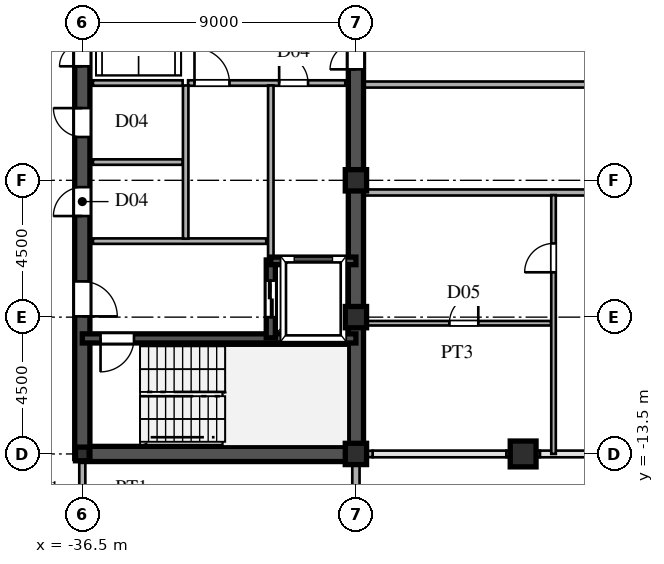
"""IFC4 building model, lengths in metres.
Left out: names, types, materials, properties, quantities, classifications, styles, units other than length and angle.
Written with IfcOpenShell. Run it as: python <this file> out.ifc"""

import sys

from ifc_helpers import new_model, si_unit, direction, frame, frame_2d, origin, origin_2d, place, context, subcontext, project, spatial, rectangle, hollow_rectangle, i_section, extrude, source, transform, mapped, element, fill, save


model = new_model("IFC4")
c1 = context("Model", 3, precision=1e-05, world=origin(), true_north=direction((0.0, 1.0)))
c2 = subcontext(c1, "Body", "Model", "MODEL_VIEW")
j1 = project(units=[si_unit("LENGTHUNIT", "METRE"), si_unit("PLANEANGLEUNIT", "RADIAN")], contexts=[c1])
p1 = place(None, origin())
s1 = spatial("IfcSite", under=j1, at=p1, CompositionType="ELEMENT")
p2 = place(p1, origin())
s2 = spatial("IfcBuilding", under=s1, at=p2, CompositionType="ELEMENT")
p3 = place(p2, frame((0.0, 0.0, 258.15)))
s3 = spatial("IfcBuildingStorey", under=s2, at=p3, CompositionType="ELEMENT", Elevation=258.15)
m1 = source(origin(), c2, "Body", "SweptSolid", [
    extrude(hollow_rectangle(XDim=0.7, YDim=0.7, WallThickness=0.03, at=origin_2d()), origin(), (0.0, 0.0, 1.0), 3.75),
])
for number, where, z_axis, x_axis in (
    (1, (-27.5, -13.5, 0.0), (0.0, 0.0, 1.0), (1.0, 0.0, 0.0)),
    (2, (-27.5, -9.0, 0.0), (0.0, 0.0, 1.0), (1.0, 0.0, 0.0)),
    (3, (-27.5, -4.5, 0.0), (0.0, 0.0, 1.0), (1.0, 0.0, 0.0)),
):
    element("IfcColumn", number, at=place(p3, frame(where, z_axis=z_axis, x_axis=x_axis)), inside=s3, PredefinedType="COLUMN", context=c2, shape_type="MappedRepresentation", body=[
        mapped(m1, transform((0.0, 0.0, 0.0), scale=1.0)),
    ])
m2 = source(origin(), c2, "Body", "SweptSolid", [
    extrude(i_section(OverallWidth=0.45, OverallDepth=0.45, WebThickness=0.016, FlangeThickness=0.025, at=origin_2d()), origin(), (0.0, 0.0, 1.0), 3.75),
])
p4 = place(p3, frame((-36.5, -13.5, 0.0), z_axis=(0.0, 0.0, 1.0), x_axis=(1.0, 0.0, 0.0)))
e4 = element("IfcColumn", 4, at=p4, inside=s3, PredefinedType="COLUMN", context=c2, shape_type="MappedRepresentation", body=[
    mapped(m2, transform((0.0, 0.0, 0.0), scale=1.0)),
])
m3 = source(origin(), c2, "Body", "SweptSolid", [
    extrude(hollow_rectangle(XDim=0.85, YDim=0.85, WallThickness=0.036, at=origin_2d()), origin(), (0.0, 0.0, 1.0), 3.75),
])
p5 = place(p3, frame((-22.0, -13.5, 0.0), z_axis=(0.0, 0.0, 1.0), x_axis=(1.0, 0.0, 0.0)))
e5 = element("IfcColumn", 5, at=p5, inside=s3, PredefinedType="COLUMN", context=c2, shape_type="MappedRepresentation", body=[
    mapped(m3, transform((0.0, 0.0, 0.0), scale=1.0)),
])
p6 = place(p3, frame((-27.5, -15.98, 0.0), z_axis=(0.0, 0.0, 1.0), x_axis=(0.0, 1.0, 0.0)))
e6 = element("IfcWall", 6, at=p6, inside=s3, PredefinedType="SOLIDWALL", context=c2, shape_type="SweptSolid", body=[
    extrude(rectangle(XDim=1.605, YDim=0.24, at=frame_2d((0.803, 0.0))), origin(), (0.0, 0.0, 1.0), 3.53),
])
p7 = place(p3, frame((-27.5, -14.375, 0.0), z_axis=(0.0, 0.0, 1.0), x_axis=(0.0, 1.0, 0.0)))
e7 = element("IfcWall", 7, at=p7, inside=s3, PredefinedType="SOLIDWALL", context=c2, shape_type="SweptSolid", body=[
    extrude(rectangle(XDim=0.62, YDim=0.24, at=frame_2d((0.31, 0.0))), origin(), (0.0, 0.0, 1.0), 3.03),
])
p8 = place(p3, frame((-27.49, -13.5, 0.0), z_axis=(0.0, 0.0, 1.0), x_axis=(1.0, 0.0, 0.0)))
e8 = element("IfcWall", 8, at=p8, inside=s3, PredefinedType="SOLIDWALL", context=c2, shape_type="SweptSolid", body=[
    extrude(rectangle(XDim=0.54, YDim=0.21, at=frame_2d((0.27, 0.0))), origin(), (0.0, 0.0, 1.0), 3.03),
])
p9 = place(p3, frame((-22.55, -13.5, 0.0), z_axis=(0.0, 0.0, 1.0), x_axis=(1.0, 0.0, 0.0)))
e9 = element("IfcWall", 9, at=p9, inside=s3, PredefinedType="SOLIDWALL", context=c2, shape_type="SweptSolid", body=[
    extrude(rectangle(XDim=1.1, YDim=0.21, at=frame_2d((0.55, 0.0))), origin(), (0.0, 0.0, 1.0), 3.03),
])
p10 = place(p3, frame((-27.5, -13.5, 0.0), z_axis=(0.0, 0.0, 1.0), x_axis=(0.0, 1.0, 0.0)))
e10 = element("IfcWall", 10, at=p10, inside=s3, PredefinedType="SHEAR", context=c2, shape_type="SweptSolid", body=[
    extrude(rectangle(XDim=12.2, YDim=0.5, at=frame_2d((6.1, 0.0))), origin(), (0.0, 0.0, 1.0), 3.53),
])
p11 = place(p3, frame((-27.5, -1.3, 0.0), z_axis=(0.0, 0.0, 1.0), x_axis=(0.0, 1.0, 0.0)))
e11 = element("IfcWall", 11, at=p11, inside=s3, PredefinedType="SHEAR", context=c2, shape_type="SweptSolid", body=[
    extrude(rectangle(XDim=2.6, YDim=0.5, at=frame_2d((1.3, 0.0))), origin(), (0.0, 0.0, 1.0), 3.53),
])
p12 = place(p11, frame((0.45, 0.0, 0.0)))
e12 = element("IfcOpeningElement", 12, at=p12, cuts=e11, PredefinedType="OPENING", context=c2, shape_type="SweptSolid", body=[
    extrude(rectangle(XDim=1.7, YDim=2.35, at=frame_2d((0.85, 1.175))), frame((0.0, 0.26, 0.0), z_axis=(0.0, -1.0, 0.0), x_axis=(1.0, 0.0, 0.0)), (0.0, 0.0, 1.0), 0.52),
])
p13 = place(p3, frame((-36.5, -13.5, 0.0), z_axis=(0.0, 0.0, 1.0), x_axis=(1.0, 0.0, 0.0)))
e13 = element("IfcWall", 13, at=p13, inside=s3, PredefinedType="SHEAR", context=c2, shape_type="SweptSolid", body=[
    extrude(rectangle(XDim=9.0, YDim=0.5, at=frame_2d((4.5, 0.0))), origin(), (0.0, 0.0, 1.0), 3.53),
])
p14 = place(p3, frame((-36.5, -13.65, 0.0), z_axis=(0.0, 0.0, 1.0), x_axis=(0.0, 1.0, 0.0)))
e14 = element("IfcWall", 14, at=p14, inside=s3, PredefinedType="SHEAR", context=c2, shape_type="SweptSolid", body=[
    extrude(rectangle(XDim=7.15, YDim=0.5, at=frame_2d((3.575, 0.0))), origin(), (0.0, 0.0, 1.0), 3.53),
])
p15 = place(p14, frame((4.675, 0.0, 0.0)))
e15 = element("IfcOpeningElement", 15, at=p15, cuts=e14, PredefinedType="OPENING", context=c2, shape_type="SweptSolid", body=[
    extrude(rectangle(XDim=1.15, YDim=2.2, at=frame_2d((0.575, 1.1))), frame((0.0, 0.26, 0.0), z_axis=(0.0, -1.0, 0.0), x_axis=(1.0, 0.0, 0.0)), (0.0, 0.0, 1.0), 0.52),
])
p16 = place(p3, frame((-36.5, -1.3, 0.0), z_axis=(0.0, 0.0, 1.0), x_axis=(0.0, 1.0, 0.0)))
e16 = element("IfcWall", 16, at=p16, inside=s3, PredefinedType="SHEAR", context=c2, shape_type="SweptSolid", body=[
    extrude(rectangle(XDim=2.6, YDim=0.5, at=frame_2d((1.3, 0.0))), origin(), (0.0, 0.0, 1.0), 3.53),
])
p17 = place(p16, frame((0.55, 0.0, 0.0)))
e17 = element("IfcOpeningElement", 17, at=p17, cuts=e16, PredefinedType="OPENING", context=c2, shape_type="SweptSolid", body=[
    extrude(rectangle(XDim=1.5, YDim=2.3, at=frame_2d((0.75, 1.15))), frame((0.0, 0.26, 0.0), z_axis=(0.0, -1.0, 0.0), x_axis=(1.0, 0.0, 0.0)), (0.0, 0.0, 1.0), 0.52),
])
p18 = place(p3, frame((-36.5, -6.5, 0.0), z_axis=(0.0, 0.0, 1.0), x_axis=(0.0, 1.0, 0.0)))
e18 = element("IfcWall", 18, at=p18, inside=s3, PredefinedType="SHEAR", context=c2, shape_type="SweptSolid", body=[
    extrude(rectangle(XDim=2.6, YDim=0.5, at=frame_2d((1.3, 0.0))), origin(), (0.0, 0.0, 1.0), 3.53),
])
p19 = place(p18, frame((0.825, 0.0, 0.0)))
e19 = element("IfcOpeningElement", 19, at=p19, cuts=e18, PredefinedType="OPENING", context=c2, shape_type="SweptSolid", body=[
    extrude(rectangle(XDim=0.95, YDim=2.15, at=frame_2d((0.475, 1.075))), frame((0.0, 0.26, 0.0), z_axis=(0.0, -1.0, 0.0), x_axis=(1.0, 0.0, 0.0)), (0.0, 0.0, 1.0), 0.52),
])
p20 = place(p3, frame((-36.5, -3.9, 0.0), z_axis=(0.0, 0.0, 1.0), x_axis=(0.0, 1.0, 0.0)))
e20 = element("IfcWall", 20, at=p20, inside=s3, PredefinedType="SHEAR", context=c2, shape_type="SweptSolid", body=[
    extrude(rectangle(XDim=2.6, YDim=0.5, at=frame_2d((1.3, 0.0))), origin(), (0.0, 0.0, 1.0), 3.53),
])
p21 = place(p20, frame((0.825, 0.0, 0.0)))
e21 = element("IfcOpeningElement", 21, at=p21, cuts=e20, PredefinedType="OPENING", context=c2, shape_type="SweptSolid", body=[
    extrude(rectangle(XDim=0.95, YDim=2.15, at=frame_2d((0.475, 1.075))), frame((0.0, 0.26, 0.0), z_axis=(0.0, -1.0, 0.0), x_axis=(1.0, 0.0, 0.0)), (0.0, 0.0, 1.0), 0.52),
])
p22 = place(p3, frame((-36.5, -9.7, 0.0), z_axis=(0.0, 0.0, 1.0), x_axis=(1.0, 0.0, 0.0)))
e22 = element("IfcWall", 22, at=p22, inside=s3, PredefinedType="SHEAR", context=c2, shape_type="SweptSolid", body=[
    extrude(rectangle(XDim=9.0, YDim=0.3, at=frame_2d((4.5, 0.0))), origin(), (0.0, 0.0, 1.0), 3.53),
])
p23 = place(p22, frame((0.6, 0.0, 0.0)))
e23 = element("IfcOpeningElement", 23, at=p23, cuts=e22, PredefinedType="OPENING", context=c2, shape_type="SweptSolid", body=[
    extrude(rectangle(XDim=1.1, YDim=2.2, at=frame_2d((0.55, 1.1))), frame((0.0, 0.16, 0.0), z_axis=(0.0, -1.0, 0.0), x_axis=(1.0, 0.0, 0.0)), (0.0, 0.0, 1.0), 0.32),
])
p24 = place(p3, frame((-30.3, -7.15, 0.0), z_axis=(0.0, 0.0, 1.0), x_axis=(1.0, 0.0, 0.0)))
e24 = element("IfcWall", 24, at=p24, inside=s3, PredefinedType="SHEAR", context=c2, shape_type="SweptSolid", body=[
    extrude(rectangle(XDim=2.8, YDim=0.25, at=frame_2d((1.4, 0.0))), origin(), (0.0, 0.0, 1.0), 3.53),
])
p25 = place(p3, frame((-30.3, -9.68, 0.0), z_axis=(0.0, 0.0, 1.0), x_axis=(0.0, 1.0, 0.0)))
e25 = element("IfcWall", 25, at=p25, inside=s3, PredefinedType="SHEAR", context=c2, shape_type="SweptSolid", body=[
    extrude(rectangle(XDim=2.56, YDim=0.3, at=frame_2d((1.28, 0.0))), origin(), (0.0, 0.0, 1.0), 3.53),
])
p26 = place(p25, frame((0.68, 0.0, 0.0)))
e26 = element("IfcOpeningElement", 26, at=p26, cuts=e25, PredefinedType="OPENING", context=c2, shape_type="SweptSolid", body=[
    extrude(rectangle(XDim=1.2, YDim=2.25, at=frame_2d((0.6, 1.125))), frame((0.0, 0.16, 0.0), z_axis=(0.0, -1.0, 0.0), x_axis=(1.0, 0.0, 0.0)), (0.0, 0.0, 1.0), 0.32),
])
p27 = place(p3, frame((-36.15, -6.5, 0.0), z_axis=(0.0, 0.0, 1.0), x_axis=(1.0, 0.0, 0.0)))
e27 = element("IfcWall", 27, at=p27, inside=s3, PredefinedType="PARTITIONING", context=c2, shape_type="SweptSolid", body=[
    extrude(rectangle(XDim=5.7, YDim=0.18, at=frame_2d((2.85, 0.0))), origin(), (0.0, 0.0, 1.0), 3.53),
])
p28 = place(p3, frame((-33.1, -6.42, 0.0), z_axis=(0.0, 0.0, 1.0), x_axis=(0.0, 1.0, 0.0)))
e28 = element("IfcWall", 28, at=p28, inside=s3, PredefinedType="PARTITIONING", context=c2, shape_type="SweptSolid", body=[
    extrude(rectangle(XDim=5.04, YDim=0.18, at=frame_2d((2.52, 0.0))), origin(), (0.0, 0.0, 1.0), 3.53),
])
p29 = place(p3, frame((-30.3, -1.3, 0.0), z_axis=(0.0, 0.0, 1.0), x_axis=(1.0, 0.0, 0.0)))
e29 = element("IfcWall", 29, at=p29, inside=s3, PredefinedType="PARTITIONING", context=c2, shape_type="SweptSolid", body=[
    extrude(rectangle(XDim=2.45, YDim=0.18, at=frame_2d((1.225, 0.0))), origin(), (0.0, 0.0, 1.0), 3.53),
])
p30 = place(p29, frame((0.275, 0.0, 0.0)))
e30 = element("IfcOpeningElement", 30, at=p30, cuts=e29, PredefinedType="OPENING", context=c2, shape_type="SweptSolid", body=[
    extrude(rectangle(XDim=0.95, YDim=2.15, at=frame_2d((0.475, 1.075))), frame((0.0, 0.1, 0.0), z_axis=(0.0, -1.0, 0.0), x_axis=(1.0, 0.0, 0.0)), (0.0, 0.0, 1.0), 0.2),
])
p31 = place(p3, frame((-33.02, -1.3, 0.0), z_axis=(0.0, 0.0, 1.0), x_axis=(1.0, 0.0, 0.0)))
e31 = element("IfcWall", 31, at=p31, inside=s3, PredefinedType="PARTITIONING", context=c2, shape_type="SweptSolid", body=[
    extrude(rectangle(XDim=2.72, YDim=0.18, at=frame_2d((1.36, 0.0))), origin(), (0.0, 0.0, 1.0), 3.53),
])
p32 = place(p31, frame((0.21, 0.0, 0.0)))
e32 = element("IfcOpeningElement", 32, at=p32, cuts=e31, PredefinedType="OPENING", context=c2, shape_type="SweptSolid", body=[
    extrude(rectangle(XDim=1.15, YDim=2.2, at=frame_2d((0.575, 1.1))), frame((0.0, 0.1, 0.0), z_axis=(0.0, -1.0, 0.0), x_axis=(1.0, 0.0, 0.0)), (0.0, 0.0, 1.0), 0.2),
])
p33 = place(p3, frame((-30.3, -7.12, 0.0), z_axis=(0.0, 0.0, 1.0), x_axis=(0.0, 1.0, 0.0)))
e33 = element("IfcWall", 33, at=p33, inside=s3, PredefinedType="PARTITIONING", context=c2, shape_type="SweptSolid", body=[
    extrude(rectangle(XDim=5.74, YDim=0.18, at=frame_2d((2.87, 0.0))), origin(), (0.0, 0.0, 1.0), 3.53),
])
for number, where, z_axis, x_axis in (
    (34, (-36.15, -1.3, 0.0), (0.0, 0.0, 1.0), (1.0, 0.0, 0.0)),
    (35, (-36.15, -3.9, 0.0), (0.0, 0.0, 1.0), (1.0, 0.0, 0.0)),
):
    element("IfcWall", number, at=place(p3, frame(where, z_axis=z_axis, x_axis=x_axis)), inside=s3, PredefinedType="PARTITIONING", context=c2, shape_type="SweptSolid", body=[
        extrude(rectangle(XDim=2.95, YDim=0.18, at=frame_2d((1.475, 0.0))), origin(), (0.0, 0.0, 1.0), 3.53),
    ])
p34 = place(p3, frame((-27.245, -9.2, 0.0), z_axis=(0.0, 0.0, 1.0), x_axis=(1.0, 0.0, 0.0)))
e36 = element("IfcWall", 36, at=p34, inside=s3, PredefinedType="PARTITIONING", context=c2, shape_type="SweptSolid", body=[
    extrude(rectangle(XDim=6.16, YDim=0.15, at=frame_2d((3.08, 0.0))), origin(), (0.0, 0.0, 1.0), 3.53),
])
p35 = place(p34, frame((2.82, 0.0, 0.0)))
e37 = element("IfcOpeningElement", 37, at=p35, cuts=e36, PredefinedType="OPENING", context=c2, shape_type="SweptSolid", body=[
    extrude(rectangle(XDim=0.95, YDim=2.15, at=frame_2d((0.475, 1.075))), frame((0.0, 0.085, 0.0), z_axis=(0.0, -1.0, 0.0), x_axis=(1.0, 0.0, 0.0)), (0.0, 0.0, 1.0), 0.17),
])
p36 = place(p3, frame((-27.245, -4.9, 0.0), z_axis=(0.0, 0.0, 1.0), x_axis=(1.0, 0.0, 0.0)))
e38 = element("IfcWall", 38, at=p36, inside=s3, PredefinedType="PARTITIONING", context=c2, shape_type="SweptSolid", body=[
    extrude(rectangle(XDim=54.49, YDim=0.2, at=frame_2d((27.245, 0.0))), origin(), (0.0, 0.0, 1.0), 3.53),
])
p37 = place(p36, frame((22.47, 0.0, 0.0)))
e39 = element("IfcOpeningElement", 39, at=p37, cuts=e38, PredefinedType="OPENING", context=c2, shape_type="SweptSolid", body=[
    extrude(rectangle(XDim=1.05, YDim=2.25, at=frame_2d((0.525, 1.125))), frame((0.0, 0.11, 0.0), z_axis=(0.0, -1.0, 0.0), x_axis=(1.0, 0.0, 0.0)), (0.0, 0.0, 1.0), 0.22),
])
p38 = place(p3, frame((-27.245, -1.35, 0.0), z_axis=(0.0, 0.0, 1.0), x_axis=(1.0, 0.0, 0.0)))
e40 = element("IfcWall", 40, at=p38, inside=s3, PredefinedType="PARTITIONING", context=c2, shape_type="SweptSolid", body=[
    extrude(rectangle(XDim=19.66, YDim=0.2, at=frame_2d((9.83, 0.0))), origin(), (0.0, 0.0, 1.0), 3.53),
])
p39 = place(p38, frame((12.97, 0.0, 0.0)))
e41 = element("IfcOpeningElement", 41, at=p39, cuts=e40, PredefinedType="OPENING", context=c2, shape_type="SweptSolid", body=[
    extrude(rectangle(XDim=1.05, YDim=2.25, at=frame_2d((0.525, 1.125))), frame((0.0, 0.11, 0.0), z_axis=(0.0, -1.0, 0.0), x_axis=(1.0, 0.0, 0.0)), (0.0, 0.0, 1.0), 0.22),
])
p40 = place(p3, frame((-36.5, -15.515, 0.0), z_axis=(0.0, 0.0, 1.0), x_axis=(0.0, 1.0, 0.0)))
e42 = element("IfcWall", 42, at=p40, inside=s3, PredefinedType="PARTITIONING", context=c2, shape_type="SweptSolid", body=[
    extrude(rectangle(XDim=1.76, YDim=0.2, at=frame_2d((0.88, 0.0))), origin(), (0.0, 0.0, 1.0), 2.93),
])
p41 = place(p3, frame((-21.0, -13.5, 0.0), z_axis=(0.0, 0.0, 1.0), x_axis=(0.0, 1.0, 0.0)))
e43 = element("IfcWall", 43, at=p41, inside=s3, PredefinedType="PARTITIONING", context=c2, shape_type="SweptSolid", body=[
    extrude(rectangle(XDim=8.515, YDim=0.15, at=frame_2d((4.257, 0.0))), origin(), (0.0, 0.0, 1.0), 3.53),
])
p42 = place(p41, frame((5.975, 0.0, 0.0)))
e44 = element("IfcOpeningElement", 44, at=p42, cuts=e43, PredefinedType="OPENING", context=c2, shape_type="SweptSolid", body=[
    extrude(rectangle(XDim=0.95, YDim=2.15, at=frame_2d((0.475, 1.075))), frame((0.0, 0.085, 0.0), z_axis=(0.0, -1.0, 0.0), x_axis=(1.0, 0.0, 0.0)), (0.0, 0.0, 1.0), 0.17),
])
m4 = source(origin(), c2, "Body", "SweptSolid", [
    extrude(rectangle(XDim=1.7, YDim=2.35, at=frame_2d((0.85, 1.175))), frame((0.0, 0.025, 0.0), z_axis=(0.0, -1.0, 0.0), x_axis=(1.0, 0.0, 0.0)), (0.0, 0.0, 1.0), 0.05),
])
p43 = place(p12, origin())
e45 = element("IfcDoor", 45, at=p43, inside=s3, OperationType="DOUBLE_SWING_LEFT", PredefinedType="DOOR", context=c2, shape_type="MappedRepresentation", body=[
    mapped(m4, transform((0.0, 0.0, 0.0), scale=1.0)),
])
fill(e12, e45)
m5 = source(origin(), c2, "Body", "SweptSolid", [
    extrude(rectangle(XDim=1.15, YDim=2.2, at=frame_2d((0.575, 1.1))), frame((0.0, 0.025, 0.0), z_axis=(0.0, -1.0, 0.0), x_axis=(1.0, 0.0, 0.0)), (0.0, 0.0, 1.0), 0.05),
])
p44 = place(p15, frame((1.15, 0.0, 0.0), z_axis=(0.0, 0.0, 1.0), x_axis=(-1.0, 0.0, 0.0)))
e46 = element("IfcDoor", 46, at=p44, inside=s3, OperationType="SINGLE_SWING_LEFT", PredefinedType="DOOR", context=c2, shape_type="MappedRepresentation", body=[
    mapped(m5, transform((0.0, 0.0, 0.0), scale=1.0)),
])
fill(e15, e46)
m6 = source(origin(), c2, "Body", "SweptSolid", [
    extrude(rectangle(XDim=1.5, YDim=2.3, at=frame_2d((0.75, 1.15))), frame((0.0, 0.025, 0.0), z_axis=(0.0, -1.0, 0.0), x_axis=(1.0, 0.0, 0.0)), (0.0, 0.0, 1.0), 0.05),
])
p45 = place(p17, origin())
e47 = element("IfcDoor", 47, at=p45, inside=s3, OperationType="DOUBLE_SWING_LEFT", PredefinedType="DOOR", context=c2, shape_type="MappedRepresentation", body=[
    mapped(m6, transform((0.0, 0.0, 0.0), scale=1.0)),
])
fill(e17, e47)
m7 = source(origin(), c2, "Body", "SweptSolid", [
    extrude(rectangle(XDim=0.95, YDim=2.15, at=frame_2d((0.475, 1.075))), frame((0.0, 0.025, 0.0), z_axis=(0.0, -1.0, 0.0), x_axis=(1.0, 0.0, 0.0)), (0.0, 0.0, 1.0), 0.05),
])
p46 = place(p19, origin())
e48 = element("IfcDoor", 48, at=p46, inside=s3, OperationType="SINGLE_SWING_LEFT", PredefinedType="DOOR", context=c2, shape_type="MappedRepresentation", body=[
    mapped(m7, transform((0.0, 0.0, 0.0), scale=1.0)),
])
fill(e19, e48)
p47 = place(p21, origin())
e49 = element("IfcDoor", 49, at=p47, inside=s3, OperationType="SINGLE_SWING_RIGHT", PredefinedType="DOOR", context=c2, shape_type="MappedRepresentation", body=[
    mapped(m7, transform((0.0, 0.0, 0.0), scale=1.0)),
])
fill(e21, e49)
m8 = source(origin(), c2, "Body", "SweptSolid", [
    extrude(rectangle(XDim=1.1, YDim=2.2, at=frame_2d((0.55, 1.1))), frame((0.0, 0.025, 0.0), z_axis=(0.0, -1.0, 0.0), x_axis=(1.0, 0.0, 0.0)), (0.0, 0.0, 1.0), 0.05),
])
p48 = place(p23, frame((1.1, 0.0, 0.0), z_axis=(0.0, 0.0, 1.0), x_axis=(-1.0, 0.0, 0.0)))
e50 = element("IfcDoor", 50, at=p48, inside=s3, OperationType="SINGLE_SWING_LEFT", PredefinedType="DOOR", context=c2, shape_type="MappedRepresentation", body=[
    mapped(m8, transform((0.0, 0.0, 0.0), scale=1.0)),
])
fill(e23, e50)
m9 = source(origin(), c2, "Body", "SweptSolid", [
    extrude(rectangle(XDim=1.2, YDim=2.25, at=frame_2d((0.6, 1.125))), frame((0.0, 0.025, 0.0), z_axis=(0.0, -1.0, 0.0), x_axis=(1.0, 0.0, 0.0)), (0.0, 0.0, 1.0), 0.05),
])
p49 = place(p26, origin())
e51 = element("IfcDoor", 51, at=p49, inside=s3, OperationType="DOUBLE_DOOR_SLIDING", PredefinedType="DOOR", context=c2, shape_type="MappedRepresentation", body=[
    mapped(m9, transform((0.0, 0.0, 0.0), scale=1.0)),
])
fill(e26, e51)
p50 = place(p30, origin())
e52 = element("IfcDoor", 52, at=p50, inside=s3, OperationType="SINGLE_SWING_LEFT", PredefinedType="DOOR", context=c2, shape_type="MappedRepresentation", body=[
    mapped(m7, transform((0.0, 0.0, 0.0), scale=1.0)),
])
fill(e30, e52)
p51 = place(p32, origin())
e53 = element("IfcDoor", 53, at=p51, inside=s3, OperationType="SINGLE_SWING_LEFT", PredefinedType="DOOR", context=c2, shape_type="MappedRepresentation", body=[
    mapped(m5, transform((0.0, 0.0, 0.0), scale=1.0)),
])
fill(e32, e53)
m10 = source(origin(), c2, "Body", "SweptSolid", [
    extrude(rectangle(XDim=0.95, YDim=2.15, at=frame_2d((0.475, 1.075))), frame((0.0, 0.025, 0.0), z_axis=(0.0, -1.0, 0.0), x_axis=(1.0, 0.0, 0.0)), (0.0, 0.0, 1.0), 0.05),
])
p52 = place(p35, origin())
e54 = element("IfcDoor", 54, at=p52, inside=s3, OperationType="SINGLE_SWING_RIGHT", PredefinedType="DOOR", context=c2, shape_type="MappedRepresentation", body=[
    mapped(m10, transform((0.0, 0.0, 0.0), scale=1.0)),
])
fill(e37, e54)
p53 = place(p42, origin())
e55 = element("IfcDoor", 55, at=p53, inside=s3, OperationType="SINGLE_SWING_LEFT", PredefinedType="DOOR", context=c2, shape_type="MappedRepresentation", body=[
    mapped(m10, transform((0.0, 0.0, 0.0), scale=1.0)),
])
fill(e44, e55)
save(model, sys.argv[1])
